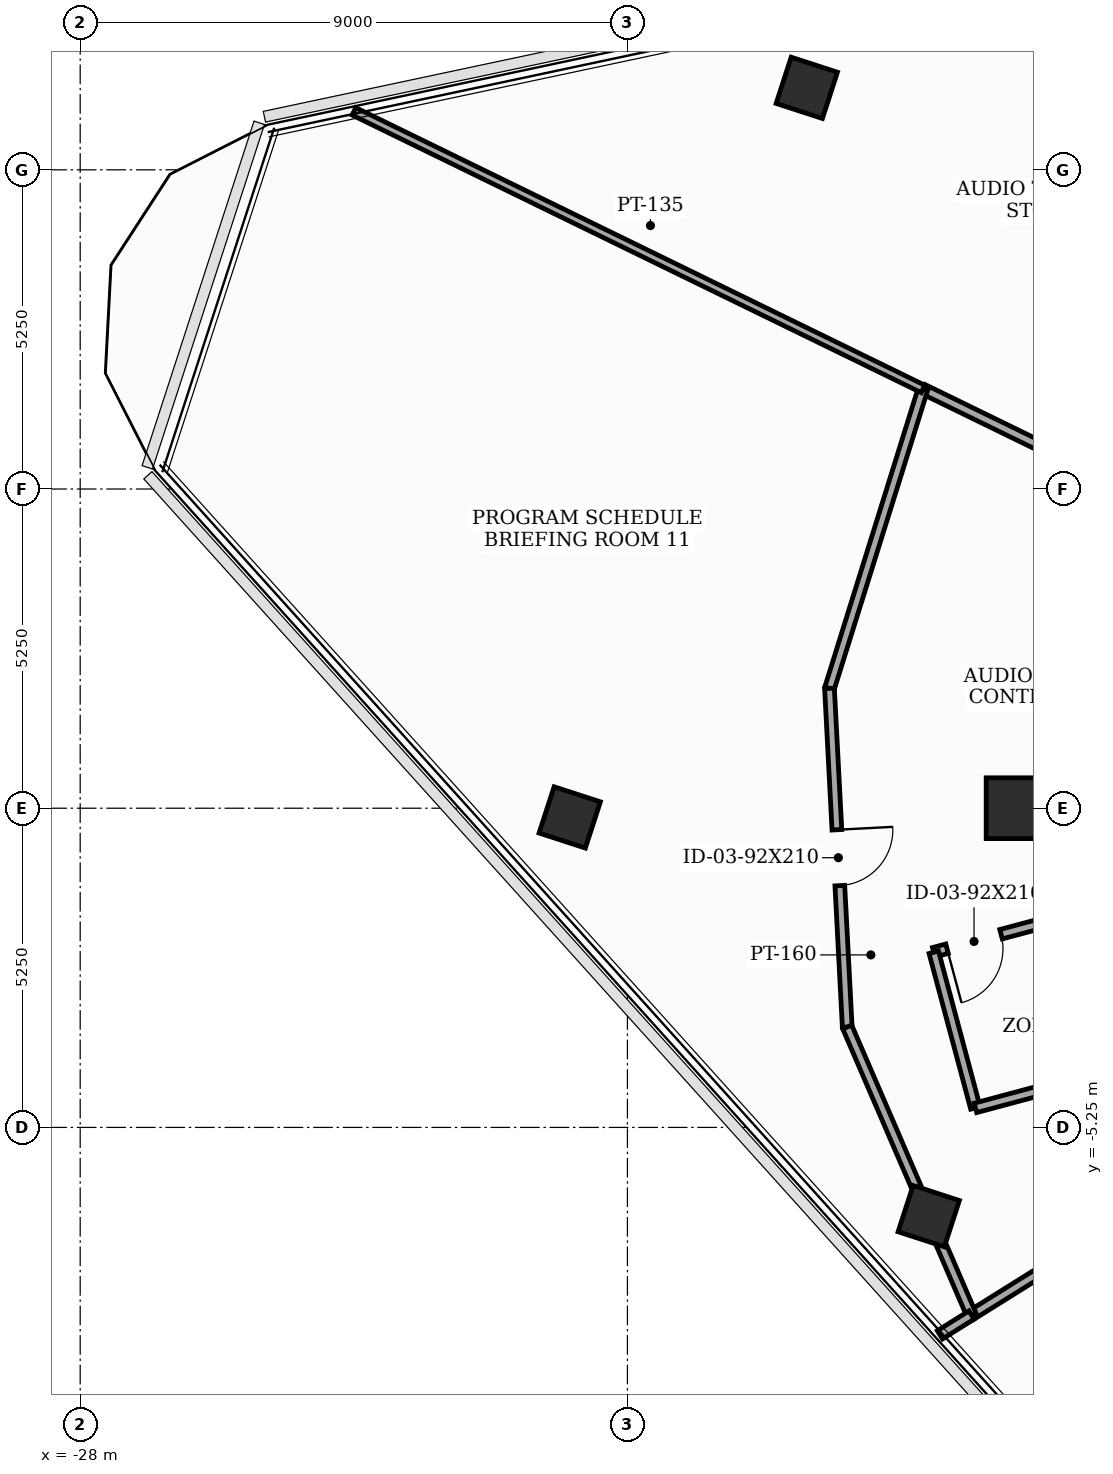
"""IFC4 building model, lengths in metres.
Left out: names, types, materials, properties, quantities, classifications, styles, units other than length and angle.
Written with IfcOpenShell. Run it as: python <this file> out.ifc"""

import sys

from ifc_helpers import new_model, si_unit, direction, frame, frame_2d, origin, origin_2d, place, context, subcontext, project, spatial, rectangle, extrude, element, fill, save


model = new_model("IFC4")
c1 = context("Model", 3, precision=1e-05, world=origin(), true_north=direction((0.0, 1.0)))
c2 = subcontext(c1, "Body", "Model", "MODEL_VIEW")
j1 = project(units=[si_unit("LENGTHUNIT", "METRE"), si_unit("PLANEANGLEUNIT", "RADIAN")], contexts=[c1])
p1 = place(None, origin())
s1 = spatial("IfcSite", under=j1, at=p1, CompositionType="ELEMENT")
p2 = place(p1, origin())
s2 = spatial("IfcBuilding", under=s1, at=p2, CompositionType="ELEMENT")
p3 = place(p2, frame((0.0, 0.0, 305.4)))
s3 = spatial("IfcBuildingStorey", under=s2, at=p3, CompositionType="ELEMENT", Elevation=305.4)
p4 = place(p3, frame((-12.6, 0.0, 0.0), z_axis=(0.0, 0.0, 1.0), x_axis=(1.0, 0.0, 0.0)))
e1 = element("IfcColumn", 1, at=p4, inside=s3, PredefinedType="COLUMN", context=c2, shape_type="SweptSolid", body=[
    extrude(rectangle(XDim=1.0, YDim=1.0, at=origin_2d()), origin(), (0.0, 0.0, 1.0), 3.7),
])
for number, where, z_axis, x_axis in (
    (2, (-16.05, 11.848, 0.0), (0.0, 0.0, 1.0), (0.309, 0.951, 0.0)),
    (3, (-19.949, -0.151, 0.0), (0.0, 0.0, 1.0), (0.309, 0.951, 0.0)),
    (4, (-14.045, -6.709, 0.0), (0.0, 0.0, 1.0), (0.309, 0.951, 0.0)),
):
    element("IfcColumn", number, at=place(p3, frame(where, z_axis=z_axis, x_axis=x_axis)), inside=s3, PredefinedType="COLUMN", context=c2, shape_type="SweptSolid", body=[
        extrude(rectangle(XDim=0.8, YDim=0.8, at=origin_2d()), origin(), (0.0, 0.0, 1.0), 3.7),
    ])
p5 = place(p3, frame((-10.65, -1.482, 0.0), z_axis=(0.0, 0.0, 1.0), x_axis=(-0.965961397105, -0.2586862565, 0.0)))
e5 = element("IfcWall", 5, at=p5, inside=s3, PredefinedType="PARTITIONING", context=c2, shape_type="SweptSolid", body=[
    extrude(rectangle(XDim=3.429, YDim=0.16, at=frame_2d((1.714, 0.0))), origin(), (0.0, 0.0, 1.0), 2.885),
])
p6 = place(p5, frame((2.283, 0.0, 0.0)))
e6 = element("IfcOpeningElement", 6, at=p6, cuts=e5, PredefinedType="OPENING", context=c2, shape_type="SweptSolid", body=[
    extrude(rectangle(XDim=0.92, YDim=2.1, at=frame_2d((0.46, 1.05))), frame((0.0, 0.09, 0.0), z_axis=(0.0, -1.0, 0.0), x_axis=(1.0, 0.0, 0.0)), (0.0, 0.0, 1.0), 0.18),
])
p7 = place(p3, frame((-13.962, -2.369, 0.0), z_axis=(0.0, 0.0, 1.0), x_axis=(0.258413725385, -0.966034340245, 0.0)))
e7 = element("IfcWall", 7, at=p7, inside=s3, PredefinedType="PARTITIONING", context=c2, shape_type="SweptSolid", body=[
    extrude(rectangle(XDim=2.65, YDim=0.16, at=frame_2d((1.325, 0.0))), origin(), (0.0, 0.0, 1.0), 3.5),
])
p8 = place(p3, frame((-13.277, -4.929, 0.0), z_axis=(0.0, 0.0, 1.0), x_axis=(0.965934830229, 0.258785439601, 0.0)))
e8 = element("IfcWall", 8, at=p8, inside=s3, PredefinedType="PARTITIONING", context=c2, shape_type="SweptSolid", body=[
    extrude(rectangle(XDim=2.72, YDim=0.16, at=frame_2d((1.36, 0.0))), origin(), (0.0, 0.0, 1.0), 2.885),
])
p9 = place(p3, frame((-13.341, -8.336, 0.0), z_axis=(0.0, 0.0, 1.0), x_axis=(0.848149563096, 0.529756848582, 0.0)))
e9 = element("IfcWall", 9, at=p9, inside=s3, PredefinedType="PARTITIONING", context=c2, shape_type="SweptSolid", body=[
    extrude(rectangle(XDim=3.173, YDim=0.16, at=frame_2d((1.586, 0.0))), origin(), (0.0, 0.0, 1.0), 2.885),
])
p10 = place(p3, frame((-8.08, 3.941, 0.0), z_axis=(0.0, 0.0, 1.0), x_axis=(-0.898780627628, 0.438398658074, 0.0)))
e10 = element("IfcWall", 10, at=p10, inside=s3, PredefinedType="PARTITIONING", context=c2, shape_type="SweptSolid", body=[
    extrude(rectangle(XDim=6.741, YDim=0.16, at=frame_2d((3.371, 0.0))), origin(), (0.0, 0.0, 1.0), 2.885),
])
p11 = place(p3, frame((-14.139, 6.896, 0.0), z_axis=(0.0, 0.0, 1.0), x_axis=(-0.298099863076, -0.954534688544, 0.0)))
e11 = element("IfcWall", 11, at=p11, inside=s3, PredefinedType="PARTITIONING", context=c2, shape_type="SweptSolid", body=[
    extrude(rectangle(XDim=5.16, YDim=0.16, at=frame_2d((2.58, 0.0))), origin(), (0.0, 0.0, 1.0), 3.5),
])
p12 = place(p3, frame((-15.677, 1.971, 0.0), z_axis=(0.0, 0.0, 1.0), x_axis=(0.052349772407, -0.998628810584, 0.0)))
e12 = element("IfcWall", 12, at=p12, inside=s3, PredefinedType="PARTITIONING", context=c2, shape_type="SweptSolid", body=[
    extrude(rectangle(XDim=5.578, YDim=0.16, at=frame_2d((2.789, 0.0))), origin(), (0.0, 0.0, 1.0), 3.035),
])
p13 = place(p12, frame((2.329, 0.0, 0.0)))
e13 = element("IfcOpeningElement", 13, at=p13, cuts=e12, PredefinedType="OPENING", context=c2, shape_type="SweptSolid", body=[
    extrude(rectangle(XDim=0.92, YDim=2.1, at=frame_2d((0.46, 1.05))), frame((0.0, 0.09, 0.0), z_axis=(0.0, -1.0, 0.0), x_axis=(1.0, 0.0, 0.0)), (0.0, 0.0, 1.0), 0.18),
])
p14 = place(p3, frame((-15.385, -3.599, 0.0), z_axis=(0.0, 0.0, 1.0), x_axis=(0.396191247476, -0.918168010455, 0.0)))
e14 = element("IfcWall", 14, at=p14, inside=s3, PredefinedType="PARTITIONING", context=c2, shape_type="SweptSolid", body=[
    extrude(rectangle(XDim=5.159, YDim=0.16, at=frame_2d((2.58, 0.0))), origin(), (0.0, 0.0, 1.0), 3.035),
])
p15 = place(p3, frame((-13.341, -8.336, 0.0), z_axis=(0.0, 0.0, 1.0), x_axis=(-0.847685142663, -0.530499669094, 0.0)))
e15 = element("IfcWall", 15, at=p15, inside=s3, PredefinedType="PARTITIONING", context=c2, shape_type="SweptSolid", body=[
    extrude(rectangle(XDim=0.614, YDim=0.16, at=frame_2d((0.307, 0.0))), origin(), (0.0, 0.0, 1.0), 3.5),
])
p16 = place(p3, frame((-23.498, 11.461, 0.0), z_axis=(0.0, 0.0, 1.0), x_axis=(0.898777683883, -0.438404693125, 0.0)))
e16 = element("IfcWall", 16, at=p16, inside=s3, PredefinedType="PARTITIONING", context=c2, shape_type="SweptSolid", body=[
    extrude(rectangle(XDim=10.413, YDim=0.135, at=frame_2d((5.207, 0.0))), origin(), (0.0, 0.0, 1.0), 3.035),
])
p17 = place(p6, origin())
e17 = element("IfcDoor", 17, at=p17, inside=s3, OperationType="SINGLE_SWING_RIGHT", PredefinedType="DOOR", context=c2, shape_type="SweptSolid", body=[
    extrude(rectangle(XDim=0.92, YDim=2.1, at=frame_2d((0.46, 1.05))), frame((0.0, 0.025, 0.0), z_axis=(0.0, -1.0, 0.0), x_axis=(1.0, 0.0, 0.0)), (0.0, 0.0, 1.0), 0.05),
])
fill(e6, e17)
p18 = place(p13, origin())
e18 = element("IfcDoor", 18, at=p18, inside=s3, OperationType="SINGLE_SWING_LEFT", PredefinedType="DOOR", context=c2, shape_type="SweptSolid", body=[
    extrude(rectangle(XDim=0.92, YDim=2.1, at=frame_2d((0.46, 1.05))), frame((0.0, 0.025, 0.0), z_axis=(0.0, -1.0, 0.0), x_axis=(1.0, 0.0, 0.0)), (0.0, 0.0, 1.0), 0.05),
])
fill(e13, e18)
save(model, sys.argv[1])
